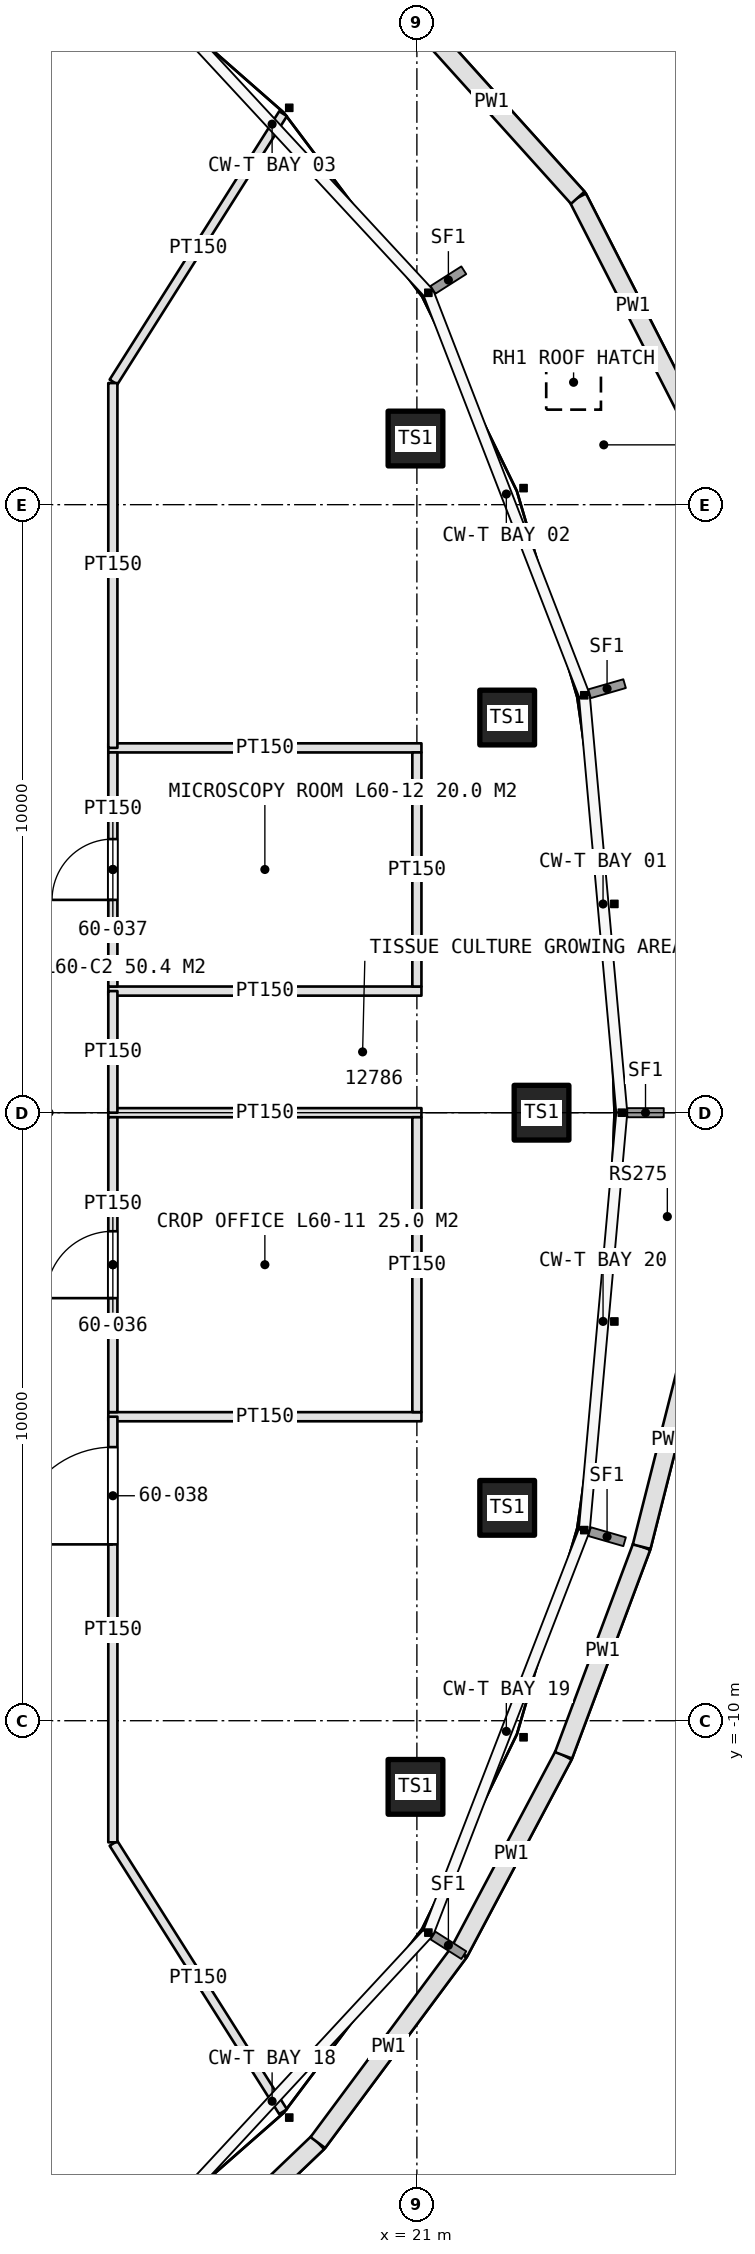
"""IFC4 building model, lengths in metres.
Left out: names, types, materials, properties, quantities, classifications, styles, units other than length and angle.
Written with IfcOpenShell. Run it as: python <this file> out.ifc"""

import sys

from ifc_helpers import new_model, si_unit, direction, frame, frame_2d, origin, origin_2d, place, context, subcontext, project, spatial, rectangle, hollow_rectangle, extrude, element, fill, save


model = new_model("IFC4")
c1 = context("Model", 3, precision=1e-05, world=origin(), true_north=direction((0.0, 1.0)))
c2 = subcontext(c1, "Body", "Model", "MODEL_VIEW")
j1 = project(units=[si_unit("LENGTHUNIT", "METRE"), si_unit("PLANEANGLEUNIT", "RADIAN")], contexts=[c1])
p1 = place(None, origin())
s1 = spatial("IfcSite", under=j1, at=p1, CompositionType="ELEMENT")
p2 = place(p1, origin())
s2 = spatial("IfcBuilding", under=s1, at=p2, CompositionType="ELEMENT")
p3 = place(p2, frame((0.0, 0.0, 271.2)))
s3 = spatial("IfcBuildingStorey", under=s2, at=p3, CompositionType="ELEMENT", Elevation=271.2)
for number, where, z_axis, x_axis in (
    (1, (23.05, 0.0, 0.775), (0.0, 0.0, 1.0), (1.0, 0.0, 0.0)),
    (2, (22.485, 6.499, 0.775), (0.0, 0.0, 1.0), (1.0, 0.0, 0.0)),
    (3, (20.977, 11.088, 0.775), (0.0, 0.0, 1.0), (1.0, 0.0, 0.0)),
):
    element("IfcColumn", number, at=place(p3, frame(where, z_axis=z_axis, x_axis=x_axis)), inside=s3, PredefinedType="COLUMN", context=c2, shape_type="SweptSolid", body=[
        extrude(hollow_rectangle(XDim=0.9, YDim=0.9, WallThickness=0.08, at=origin_2d()), origin(), (0.0, 0.0, 1.0), 3.425),
    ])
for number, where, z_axis, x_axis in (
    (4, (20.977, -11.088, 0.0), (0.0, 0.0, 1.0), (1.0, 0.0, 0.0)),
    (5, (22.485, -6.499, 0.0), (0.0, 0.0, 1.0), (1.0, 0.0, 0.0)),
):
    element("IfcColumn", number, at=place(p3, frame(where, z_axis=z_axis, x_axis=x_axis)), inside=s3, PredefinedType="COLUMN", context=c2, shape_type="SweptSolid", body=[
        extrude(hollow_rectangle(XDim=0.9, YDim=0.9, WallThickness=0.08, at=origin_2d()), origin(), (0.0, 0.0, 1.0), 4.2),
    ])
p4 = place(p3, frame((25.461, 11.494, 0.0), z_axis=(0.0, 0.0, 1.0), x_axis=(-0.454710050017, 0.890639528885, 0.0)))
e6 = element("IfcWall", 6, at=p4, inside=s3, PredefinedType="PARAPET", context=c2, shape_type="SweptSolid", body=[
    extrude(rectangle(XDim=3.991, YDim=0.3, at=frame_2d((1.996, 0.0))), origin(), (0.0, 0.0, 1.0), 1.1),
])
p5 = place(p3, frame((23.646, 15.049, 0.0), z_axis=(0.0, 0.0, 1.0), x_axis=(-0.669419829653, 0.742884305708, 0.0)))
e7 = element("IfcWall", 7, at=p5, inside=s3, PredefinedType="PARAPET", context=c2, shape_type="SweptSolid", body=[
    extrude(rectangle(XDim=4.237, YDim=0.3, at=frame_2d((2.119, 0.0))), origin(), (0.0, 0.0, 1.0), 1.1),
])
p6 = place(p3, frame((16.555, -19.632, 0.0), z_axis=(0.0, 0.0, 1.0), x_axis=(0.722625530555, 0.691239714274, 0.0)))
e8 = element("IfcWall", 8, at=p6, inside=s3, PredefinedType="PARAPET", context=c2, shape_type="SweptSolid", body=[
    extrude(rectangle(XDim=3.897, YDim=0.3, at=frame_2d((1.949, 0.0))), origin(), (0.0, 0.0, 1.0), 1.1),
])
p7 = place(p3, frame((19.371, -16.938, 0.0), z_axis=(0.0, 0.0, 1.0), x_axis=(0.595955042577, 0.803017800069, 0.0)))
e9 = element("IfcWall", 9, at=p7, inside=s3, PredefinedType="PARAPET", context=c2, shape_type="SweptSolid", body=[
    extrude(rectangle(XDim=3.899, YDim=0.3, at=frame_2d((1.95, 0.0))), origin(), (0.0, 0.0, 1.0), 1.1),
])
p8 = place(p3, frame((21.695, -13.807, 0.0), z_axis=(0.0, 0.0, 1.0), x_axis=(0.468588498899, 0.883416560123, 0.0)))
e10 = element("IfcWall", 10, at=p8, inside=s3, PredefinedType="PARAPET", context=c2, shape_type="SweptSolid", body=[
    extrude(rectangle(XDim=3.665, YDim=0.3, at=frame_2d((1.833, 0.0))), origin(), (0.0, 0.0, 1.0), 1.1),
])
p9 = place(p3, frame((23.412, -10.569, 0.0), z_axis=(0.0, 0.0, 1.0), x_axis=(0.350539221845, 0.93654805213, 0.0)))
e11 = element("IfcWall", 11, at=p9, inside=s3, PredefinedType="PARAPET", context=c2, shape_type="SweptSolid", body=[
    extrude(rectangle(XDim=3.664, YDim=0.3, at=frame_2d((1.832, 0.0))), origin(), (0.0, 0.0, 1.0), 1.1),
])
p10 = place(p3, frame((24.697, -7.138, 0.0), z_axis=(0.0, 0.0, 1.0), x_axis=(0.245276056577, 0.969453276889, 0.0)))
e12 = element("IfcWall", 12, at=p10, inside=s3, PredefinedType="PARAPET", context=c2, shape_type="SweptSolid", body=[
    extrude(rectangle(XDim=3.625, YDim=0.3, at=frame_2d((1.812, 0.0))), origin(), (0.0, 0.0, 1.0), 1.1),
])
for number, where, z_axis, x_axis in (
    (13, (15.925, -5.0, 0.0), (0.0, 0.0, 1.0), (1.0, 0.0, 0.0)),
    (14, (15.925, 0.0, 0.0), (0.0, 0.0, 1.0), (1.0, 0.0, 0.0)),
):
    element("IfcWall", number, at=place(p3, frame(where, z_axis=z_axis, x_axis=x_axis)), inside=s3, PredefinedType="PARTITIONING", context=c2, shape_type="SweptSolid", body=[
        extrude(rectangle(XDim=5.15, YDim=0.15, at=frame_2d((2.575, 0.0))), origin(), (0.0, 0.0, 1.0), 3.0),
    ])
p11 = place(p3, frame((16.0, -4.925, 0.0), z_axis=(0.0, 0.0, 1.0), x_axis=(0.0, 1.0, 0.0)))
e15 = element("IfcWall", 15, at=p11, inside=s3, PredefinedType="PARTITIONING", context=c2, shape_type="SweptSolid", body=[
    extrude(rectangle(XDim=4.85, YDim=0.15, at=frame_2d((2.425, 0.0))), origin(), (0.0, 0.0, 1.0), 3.0),
])
p12 = place(p11, frame((1.875, 0.0, 0.0)))
e16 = element("IfcOpeningElement", 16, at=p12, cuts=e15, PredefinedType="OPENING", context=c2, shape_type="SweptSolid", body=[
    extrude(rectangle(XDim=1.1, YDim=2.3, at=frame_2d((0.55, 1.15))), frame((0.0, 0.085, 0.0), z_axis=(0.0, -1.0, 0.0), x_axis=(1.0, 0.0, 0.0)), (0.0, 0.0, 1.0), 0.17),
])
p13 = place(p3, frame((21.0, -4.925, 0.0), z_axis=(0.0, 0.0, 1.0), x_axis=(0.0, 1.0, 0.0)))
e17 = element("IfcWall", 17, at=p13, inside=s3, PredefinedType="PARTITIONING", context=c2, shape_type="SweptSolid", body=[
    extrude(rectangle(XDim=4.85, YDim=0.15, at=frame_2d((2.425, 0.0))), origin(), (0.0, 0.0, 1.0), 3.0),
])
for number, where, z_axis, x_axis in (
    (18, (15.925, 2.0, 0.0), (0.0, 0.0, 1.0), (1.0, 0.0, 0.0)),
    (19, (15.925, 6.0, 0.0), (0.0, 0.0, 1.0), (1.0, 0.0, 0.0)),
):
    element("IfcWall", number, at=place(p3, frame(where, z_axis=z_axis, x_axis=x_axis)), inside=s3, PredefinedType="PARTITIONING", context=c2, shape_type="SweptSolid", body=[
        extrude(rectangle(XDim=5.15, YDim=0.15, at=frame_2d((2.575, 0.0))), origin(), (0.0, 0.0, 1.0), 3.0),
    ])
p14 = place(p3, frame((16.0, 2.075, 0.0), z_axis=(0.0, 0.0, 1.0), x_axis=(0.0, 1.0, 0.0)))
e20 = element("IfcWall", 20, at=p14, inside=s3, PredefinedType="PARTITIONING", context=c2, shape_type="SweptSolid", body=[
    extrude(rectangle(XDim=3.85, YDim=0.15, at=frame_2d((1.925, 0.0))), origin(), (0.0, 0.0, 1.0), 3.0),
])
p15 = place(p14, frame((1.425, 0.0, 0.0)))
e21 = element("IfcOpeningElement", 21, at=p15, cuts=e20, PredefinedType="OPENING", context=c2, shape_type="SweptSolid", body=[
    extrude(rectangle(XDim=1.0, YDim=2.2, at=frame_2d((0.5, 1.1))), frame((0.0, 0.085, 0.0), z_axis=(0.0, -1.0, 0.0), x_axis=(1.0, 0.0, 0.0)), (0.0, 0.0, 1.0), 0.17),
])
p16 = place(p3, frame((21.0, 2.075, 0.0), z_axis=(0.0, 0.0, 1.0), x_axis=(0.0, 1.0, 0.0)))
e22 = element("IfcWall", 22, at=p16, inside=s3, PredefinedType="PARTITIONING", context=c2, shape_type="SweptSolid", body=[
    extrude(rectangle(XDim=3.85, YDim=0.15, at=frame_2d((1.925, 0.0))), origin(), (0.0, 0.0, 1.0), 3.0),
])
for number, where, z_axis, x_axis in (
    (23, (16.011, -12.017, 0.0), (0.0, 0.0, 1.0), (0.534, -0.845, 0.0)),
    (24, (16.011, 12.017, 0.0), (0.0, 0.0, 1.0), (0.534, 0.845, 0.0)),
):
    element("IfcWall", number, at=place(p3, frame(where, z_axis=z_axis, x_axis=x_axis)), inside=s3, PredefinedType="PARTITIONING", context=c2, shape_type="SweptSolid", body=[
        extrude(rectangle(XDim=5.22, YDim=0.15, at=frame_2d((2.61, 0.0))), origin(), (0.0, 0.0, 1.0), 3.0),
    ])
p17 = place(p3, frame((16.0, -12.0, 0.0), z_axis=(0.0, 0.0, 1.0), x_axis=(0.0, 1.0, 0.0)))
e25 = element("IfcWall", 25, at=p17, inside=s3, PredefinedType="PARTITIONING", context=c2, shape_type="SweptSolid", body=[
    extrude(rectangle(XDim=7.0, YDim=0.15, at=frame_2d((3.5, 0.0))), origin(), (0.0, 0.0, 1.0), 3.0),
])
p18 = place(p17, frame((4.9, 0.0, 0.0)))
e26 = element("IfcOpeningElement", 26, at=p18, cuts=e25, PredefinedType="OPENING", context=c2, shape_type="SweptSolid", body=[
    extrude(rectangle(XDim=1.6, YDim=2.4, at=frame_2d((0.8, 1.2))), frame((0.0, 0.085, 0.0), z_axis=(0.0, -1.0, 0.0), x_axis=(1.0, 0.0, 0.0)), (0.0, 0.0, 1.0), 0.17),
])
p19 = place(p3, frame((16.0, 0.0, 0.0), z_axis=(0.0, 0.0, 1.0), x_axis=(0.0, 1.0, 0.0)))
e27 = element("IfcWall", 27, at=p19, inside=s3, PredefinedType="PARTITIONING", context=c2, shape_type="SweptSolid", body=[
    extrude(rectangle(XDim=2.0, YDim=0.15, at=frame_2d((1.0, 0.0))), origin(), (0.0, 0.0, 1.0), 3.0),
])
p20 = place(p3, frame((16.0, 6.0, 0.0), z_axis=(0.0, 0.0, 1.0), x_axis=(0.0, 1.0, 0.0)))
e28 = element("IfcWall", 28, at=p20, inside=s3, PredefinedType="PARTITIONING", context=c2, shape_type="SweptSolid", body=[
    extrude(rectangle(XDim=6.0, YDim=0.15, at=frame_2d((3.0, 0.0))), origin(), (0.0, 0.0, 1.0), 3.0),
])
p21 = place(p3, frame((0.0, 0.0, -0.275)))
p22 = place(p21, frame((23.577, 12.013, 0.0)))
p23 = place(p22, frame((0.0, 0.0, 0.225)))
e29 = element("IfcWindow", 29, at=p23, inside=s3, PartitioningType="SINGLE_PANEL", PredefinedType="SKYLIGHT", context=c2, shape_type="SweptSolid", body=[
    extrude(rectangle(XDim=0.9, YDim=0.9, at=origin_2d()), origin(), (0.0, 0.0, 1.0), 0.05),
])
p24 = place(p12, origin())
e30 = element("IfcDoor", 30, at=p24, inside=s3, OperationType="SINGLE_SWING_LEFT", PredefinedType="DOOR", context=c2, shape_type="SweptSolid", body=[
    extrude(rectangle(XDim=1.1, YDim=2.3, at=frame_2d((0.55, 1.15))), frame((0.0, 0.025, 0.0), z_axis=(0.0, -1.0, 0.0), x_axis=(1.0, 0.0, 0.0)), (0.0, 0.0, 1.0), 0.05),
])
fill(e16, e30)
p25 = place(p15, origin())
e31 = element("IfcDoor", 31, at=p25, inside=s3, OperationType="SINGLE_SWING_LEFT", PredefinedType="DOOR", context=c2, shape_type="SweptSolid", body=[
    extrude(rectangle(XDim=1.0, YDim=2.2, at=frame_2d((0.5, 1.1))), frame((0.0, 0.025, 0.0), z_axis=(0.0, -1.0, 0.0), x_axis=(1.0, 0.0, 0.0)), (0.0, 0.0, 1.0), 0.05),
])
fill(e21, e31)
p26 = place(p18, origin())
e32 = element("IfcDoor", 32, at=p26, inside=s3, OperationType="DOUBLE_DOOR_SINGLE_SWING", PredefinedType="DOOR", context=c2, shape_type="SweptSolid", body=[
    extrude(rectangle(XDim=1.6, YDim=2.4, at=frame_2d((0.8, 1.2))), frame((0.0, 0.025, 0.0), z_axis=(0.0, -1.0, 0.0), x_axis=(1.0, 0.0, 0.0)), (0.0, 0.0, 1.0), 0.05),
])
fill(e26, e32)
save(model, sys.argv[1])
